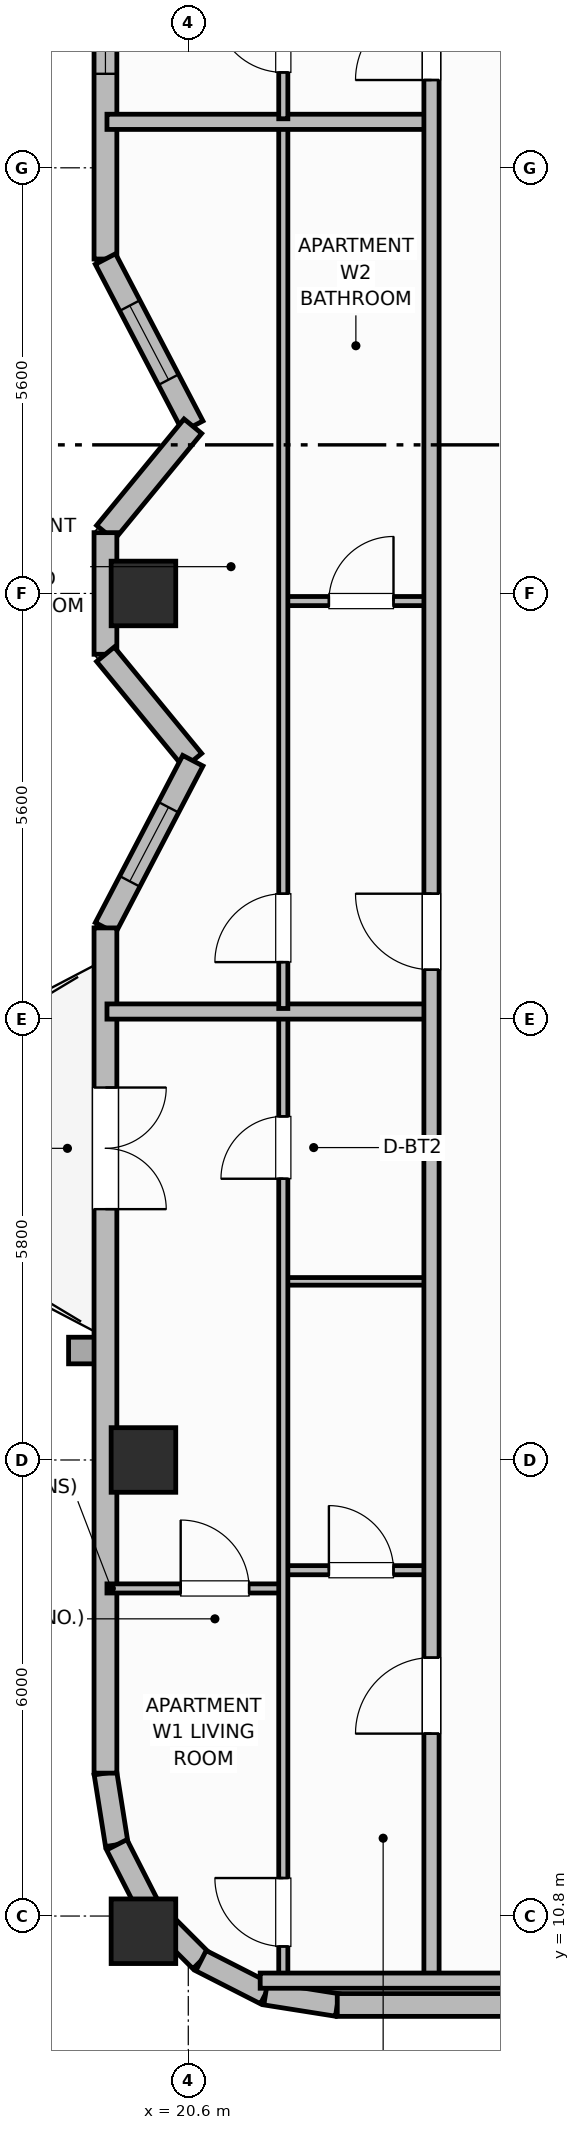
"""IFC4 building model, lengths in metres.
Left out: names, types, materials, properties, quantities, classifications, styles, units other than length and angle.
Written with IfcOpenShell. Run it as: python <this file> out.ifc"""

import sys

from ifc_helpers import new_model, si_unit, direction, frame, frame_2d, origin, origin_2d, place, context, subcontext, project, spatial, rectangle, extrude, element, fill, save


model = new_model("IFC4")
c1 = context("Model", 3, precision=1e-05, world=origin(), true_north=direction((0.0, 1.0)))
c2 = subcontext(c1, "Body", "Model", "MODEL_VIEW")
j1 = project(units=[si_unit("LENGTHUNIT", "METRE"), si_unit("PLANEANGLEUNIT", "RADIAN")], contexts=[c1])
p1 = place(None, origin())
s1 = spatial("IfcSite", under=j1, at=p1, CompositionType="ELEMENT")
p2 = place(p1, origin())
s2 = spatial("IfcBuilding", under=s1, at=p2, CompositionType="ELEMENT")
p3 = place(p2, frame((0.0, 0.0, 236.9)))
s3 = spatial("IfcBuildingStorey", under=s2, at=p3, CompositionType="ELEMENT", Elevation=236.9)
for number, where, z_axis, x_axis in (
    (1, (20.01, 10.6, 0.0), (0.0, 0.0, 1.0), (1.0, 0.0, 0.0)),
    (2, (20.01, 16.8, 0.0), (0.0, 0.0, 1.0), (1.0, 0.0, 0.0)),
    (3, (20.01, 28.2, 0.0), (0.0, 0.0, 1.0), (1.0, 0.0, 0.0)),
):
    element("IfcColumn", number, at=place(p3, frame(where, z_axis=z_axis, x_axis=x_axis)), inside=s3, PredefinedType="COLUMN", context=c2, shape_type="SweptSolid", body=[
        extrude(rectangle(XDim=0.85, YDim=0.85, at=origin_2d()), origin(), (0.0, 0.0, 1.0), 3.7),
    ])
p4 = place(p3, frame((19.51, 12.68, 0.0), z_axis=(0.0, 0.0, 1.0), x_axis=(0.156343617883, -0.987702725088, 0.0)))
e4 = element("IfcWall", 4, at=p4, inside=s3, PredefinedType="SOLIDWALL", context=c2, shape_type="SweptSolid", body=[
    extrude(rectangle(XDim=0.954, YDim=0.3, at=frame_2d((0.477, 0.0))), origin(), (0.0, 0.0, 1.0), 2.73),
])
for number, where, z_axis, x_axis in (
    (5, (19.659, 11.738, 0.0), (0.0, 0.0, 1.0), (0.454, -0.891, 0.0)),
    (6, (20.093, 10.887, 0.0), (0.0, 0.0, 1.0), (0.707, -0.707, 0.0)),
):
    element("IfcWall", number, at=place(p3, frame(where, z_axis=z_axis, x_axis=x_axis)), inside=s3, PredefinedType="SOLIDWALL", context=c2, shape_type="SweptSolid", body=[
        extrude(rectangle(XDim=0.954, YDim=0.3, at=frame_2d((0.477, 0.0))), origin(), (0.0, 0.0, 1.0), 2.73),
    ])
p5 = place(p3, frame((20.767, 10.212, 0.0), z_axis=(0.0, 0.0, 1.0), x_axis=(0.891023873617, -0.45395644796, 0.0)))
e7 = element("IfcWall", 7, at=p5, inside=s3, PredefinedType="SOLIDWALL", context=c2, shape_type="SweptSolid", body=[
    extrude(rectangle(XDim=0.954, YDim=0.3, at=frame_2d((0.477, 0.0))), origin(), (0.0, 0.0, 1.0), 2.73),
])
p6 = place(p3, frame((21.617, 9.779, 0.0), z_axis=(0.0, 0.0, 1.0), x_axis=(0.987669453596, -0.156553666304, 0.0)))
e8 = element("IfcWall", 8, at=p6, inside=s3, PredefinedType="SOLIDWALL", context=c2, shape_type="SweptSolid", body=[
    extrude(rectangle(XDim=0.954, YDim=0.3, at=frame_2d((0.477, 0.0))), origin(), (0.0, 0.0, 1.0), 2.73),
])
p7 = place(p3, frame((22.56, 9.63, 0.0), z_axis=(0.0, 0.0, 1.0), x_axis=(1.0, 0.0, 0.0)))
e9 = element("IfcWall", 9, at=p7, inside=s3, PredefinedType="SOLIDWALL", context=c2, shape_type="SweptSolid", body=[
    extrude(rectangle(XDim=4.45, YDim=0.3, at=frame_2d((2.225, 0.0))), origin(), (0.0, 0.0, 1.0), 2.73),
])
p8 = place(p3, frame((19.51, 43.72, 0.0), z_axis=(0.0, 0.0, 1.0), x_axis=(0.0, -1.0, 0.0)))
e10 = element("IfcWall", 10, at=p8, inside=s3, PredefinedType="SOLIDWALL", context=c2, shape_type="SweptSolid", body=[
    extrude(rectangle(XDim=11.12, YDim=0.3, at=frame_2d((5.56, 0.0))), origin(), (0.0, 0.0, 1.0), 2.73),
])
p9 = place(p8, frame((1.037, 0.0, 0.95)))
e11 = element("IfcOpeningElement", 11, at=p9, cuts=e10, PredefinedType="OPENING", context=c2, shape_type="SweptSolid", body=[
    extrude(rectangle(XDim=1.1, YDim=1.65, at=frame_2d((0.55, 0.825))), frame((0.0, 0.16, 0.0), z_axis=(0.0, -1.0, 0.0), x_axis=(1.0, 0.0, 0.0)), (0.0, 0.0, 1.0), 0.32),
])
p10 = place(p8, frame((5.36, 0.0, 0.95)))
e12 = element("IfcOpeningElement", 12, at=p10, cuts=e10, PredefinedType="OPENING", context=c2, shape_type="SweptSolid", body=[
    extrude(rectangle(XDim=1.1, YDim=1.65, at=frame_2d((0.55, 0.825))), frame((0.0, 0.16, 0.0), z_axis=(0.0, -1.0, 0.0), x_axis=(1.0, 0.0, 0.0)), (0.0, 0.0, 1.0), 0.32),
])
p11 = place(p8, frame((7.583, 0.0, 0.95)))
e13 = element("IfcOpeningElement", 13, at=p11, cuts=e10, PredefinedType="OPENING", context=c2, shape_type="SweptSolid", body=[
    extrude(rectangle(XDim=1.1, YDim=1.65, at=frame_2d((0.55, 0.825))), frame((0.0, 0.16, 0.0), z_axis=(0.0, -1.0, 0.0), x_axis=(1.0, 0.0, 0.0)), (0.0, 0.0, 1.0), 0.32),
])
p12 = place(p3, frame((19.51, 32.6, 0.0), z_axis=(0.0, 0.0, 1.0), x_axis=(0.463191013929, -0.88625847506, 0.0)))
e14 = element("IfcWall", 14, at=p12, inside=s3, PredefinedType="SOLIDWALL", context=c2, shape_type="SweptSolid", body=[
    extrude(rectangle(XDim=2.483, YDim=0.3, at=frame_2d((1.241, 0.0))), origin(), (0.0, 0.0, 1.0), 2.73),
])
p13 = place(p12, frame((0.691, 0.0, 0.92)))
e15 = element("IfcOpeningElement", 15, at=p13, cuts=e14, PredefinedType="OPENING", context=c2, shape_type="SweptSolid", body=[
    extrude(rectangle(XDim=1.1, YDim=1.65, at=frame_2d((0.55, 0.825))), frame((0.0, 0.16, 0.0), z_axis=(0.0, -1.0, 0.0), x_axis=(1.0, 0.0, 0.0)), (0.0, 0.0, 1.0), 0.32),
])
p14 = place(p3, frame((20.66, 30.4, 0.0), z_axis=(0.0, 0.0, 1.0), x_axis=(-0.634733675645, -0.772730975827, 0.0)))
e16 = element("IfcWall", 16, at=p14, inside=s3, PredefinedType="SOLIDWALL", context=c2, shape_type="SweptSolid", body=[
    extrude(rectangle(XDim=1.812, YDim=0.3, at=frame_2d((0.906, 0.0))), origin(), (0.0, 0.0, 1.0), 2.73),
])
p15 = place(p3, frame((19.51, 29.0, 0.0), z_axis=(0.0, 0.0, 1.0), x_axis=(0.0, -1.0, 0.0)))
e17 = element("IfcWall", 17, at=p15, inside=s3, PredefinedType="SOLIDWALL", context=c2, shape_type="SweptSolid", body=[
    extrude(rectangle(XDim=1.6, YDim=0.3, at=frame_2d((0.8, 0.0))), origin(), (0.0, 0.0, 1.0), 2.73),
])
p16 = place(p3, frame((19.51, 27.4, 0.0), z_axis=(0.0, 0.0, 1.0), x_axis=(0.634733675645, -0.772730975827, 0.0)))
e18 = element("IfcWall", 18, at=p16, inside=s3, PredefinedType="SOLIDWALL", context=c2, shape_type="SweptSolid", body=[
    extrude(rectangle(XDim=1.812, YDim=0.3, at=frame_2d((0.906, 0.0))), origin(), (0.0, 0.0, 1.0), 2.73),
])
p17 = place(p3, frame((20.66, 26.0, 0.0), z_axis=(0.0, 0.0, 1.0), x_axis=(-0.46323138706, -0.886237373418, 0.0)))
e19 = element("IfcWall", 19, at=p17, inside=s3, PredefinedType="SOLIDWALL", context=c2, shape_type="SweptSolid", body=[
    extrude(rectangle(XDim=2.482, YDim=0.3, at=frame_2d((1.241, 0.0))), origin(), (0.0, 0.0, 1.0), 2.73),
])
p18 = place(p17, frame((0.691, 0.0, 0.92)))
e20 = element("IfcOpeningElement", 20, at=p18, cuts=e19, PredefinedType="OPENING", context=c2, shape_type="SweptSolid", body=[
    extrude(rectangle(XDim=1.1, YDim=1.65, at=frame_2d((0.55, 0.825))), frame((0.0, 0.16, 0.0), z_axis=(0.0, -1.0, 0.0), x_axis=(1.0, 0.0, 0.0)), (0.0, 0.0, 1.0), 0.32),
])
p19 = place(p3, frame((19.51, 23.8, 0.0), z_axis=(0.0, 0.0, 1.0), x_axis=(0.0, -1.0, 0.0)))
e21 = element("IfcWall", 21, at=p19, inside=s3, PredefinedType="SOLIDWALL", context=c2, shape_type="SweptSolid", body=[
    extrude(rectangle(XDim=11.12, YDim=0.3, at=frame_2d((5.56, 0.0))), origin(), (0.0, 0.0, 1.0), 2.73),
])
p20 = place(p19, frame((2.1, 0.0, 0.0)))
e22 = element("IfcOpeningElement", 22, at=p20, cuts=e21, PredefinedType="OPENING", context=c2, shape_type="SweptSolid", body=[
    extrude(rectangle(XDim=1.6, YDim=2.1, at=frame_2d((0.8, 1.05))), frame((0.0, 0.16, 0.0), z_axis=(0.0, -1.0, 0.0), x_axis=(1.0, 0.0, 0.0)), (0.0, 0.0, 1.0), 0.32),
])
p21 = place(p3, frame((21.85, 15.35, 0.0), z_axis=(0.0, 0.0, 1.0), x_axis=(1.0, 0.0, 0.0)))
e23 = element("IfcWall", 23, at=p21, inside=s3, PredefinedType="PARTITIONING", context=c2, shape_type="SweptSolid", body=[
    extrude(rectangle(XDim=1.95, YDim=0.12, at=frame_2d((0.975, 0.0))), origin(), (0.0, 0.0, 1.0), 2.56),
])
p22 = place(p21, frame((0.6, 0.0, 0.0)))
e24 = element("IfcOpeningElement", 24, at=p22, cuts=e23, PredefinedType="OPENING", context=c2, shape_type="SweptSolid", body=[
    extrude(rectangle(XDim=0.85, YDim=2.1, at=frame_2d((0.425, 1.05))), frame((0.0, 0.07, 0.0), z_axis=(0.0, -1.0, 0.0), x_axis=(1.0, 0.0, 0.0)), (0.0, 0.0, 1.0), 0.14),
])
p23 = place(p3, frame((21.85, 19.15, 0.0), z_axis=(0.0, 0.0, 1.0), x_axis=(1.0, 0.0, 0.0)))
e25 = element("IfcWall", 25, at=p23, inside=s3, PredefinedType="PARTITIONING", context=c2, shape_type="SweptSolid", body=[
    extrude(rectangle(XDim=1.95, YDim=0.1, at=frame_2d((0.975, 0.0))), origin(), (0.0, 0.0, 1.0), 2.56),
])
p24 = place(p3, frame((19.53, 15.11, 0.0), z_axis=(0.0, 0.0, 1.0), x_axis=(1.0, 0.0, 0.0)))
e26 = element("IfcWall", 26, at=p24, inside=s3, PredefinedType="PARTITIONING", context=c2, shape_type="SweptSolid", body=[
    extrude(rectangle(XDim=2.32, YDim=0.12, at=frame_2d((1.16, 0.0))), origin(), (0.0, 0.0, 1.0), 2.56),
])
p25 = place(p24, frame((0.97, 0.0, 0.0)))
e27 = element("IfcOpeningElement", 27, at=p25, cuts=e26, PredefinedType="OPENING", context=c2, shape_type="SweptSolid", body=[
    extrude(rectangle(XDim=0.9, YDim=2.1, at=frame_2d((0.45, 1.05))), frame((0.0, 0.07, 0.0), z_axis=(0.0, -1.0, 0.0), x_axis=(1.0, 0.0, 0.0)), (0.0, 0.0, 1.0), 0.14),
])
p26 = place(p3, frame((21.85, 9.99, 0.0), z_axis=(0.0, 0.0, 1.0), x_axis=(0.0, 1.0, 0.0)))
e28 = element("IfcWall", 28, at=p26, inside=s3, PredefinedType="PARTITIONING", context=c2, shape_type="SweptSolid", body=[
    extrude(rectangle(XDim=12.67, YDim=0.12, at=frame_2d((6.335, 0.0))), origin(), (0.0, 0.0, 1.0), 2.56),
])
p27 = place(p26, frame((0.41, 0.0, 0.0)))
e29 = element("IfcOpeningElement", 29, at=p27, cuts=e28, PredefinedType="OPENING", context=c2, shape_type="SweptSolid", body=[
    extrude(rectangle(XDim=0.9, YDim=2.1, at=frame_2d((0.45, 1.05))), frame((0.0, 0.07, 0.0), z_axis=(0.0, -1.0, 0.0), x_axis=(1.0, 0.0, 0.0)), (0.0, 0.0, 1.0), 0.14),
])
p28 = place(p26, frame((10.51, 0.0, 0.0)))
e30 = element("IfcOpeningElement", 30, at=p28, cuts=e28, PredefinedType="OPENING", context=c2, shape_type="SweptSolid", body=[
    extrude(rectangle(XDim=0.82, YDim=2.08, at=frame_2d((0.41, 1.04))), frame((0.0, 0.07, 0.0), z_axis=(0.0, -1.0, 0.0), x_axis=(1.0, 0.0, 0.0)), (0.0, 0.0, 1.0), 0.14),
])
p29 = place(p3, frame((19.53, 22.7, 0.0), z_axis=(0.0, 0.0, 1.0), x_axis=(1.0, 0.0, 0.0)))
e31 = element("IfcWall", 31, at=p29, inside=s3, PredefinedType="PARTITIONING", context=c2, shape_type="SweptSolid", body=[
    extrude(rectangle(XDim=4.27, YDim=0.2, at=frame_2d((2.135, 0.0))), origin(), (0.0, 0.0, 1.0), 2.56),
])
p30 = place(p3, frame((21.85, 28.1, 0.0), z_axis=(0.0, 0.0, 1.0), x_axis=(1.0, 0.0, 0.0)))
e32 = element("IfcWall", 32, at=p30, inside=s3, PredefinedType="PARTITIONING", context=c2, shape_type="SweptSolid", body=[
    extrude(rectangle(XDim=1.95, YDim=0.12, at=frame_2d((0.975, 0.0))), origin(), (0.0, 0.0, 1.0), 2.56),
])
p31 = place(p30, frame((0.6, 0.0, 0.0)))
e33 = element("IfcOpeningElement", 33, at=p31, cuts=e32, PredefinedType="OPENING", context=c2, shape_type="SweptSolid", body=[
    extrude(rectangle(XDim=0.85, YDim=2.1, at=frame_2d((0.425, 1.05))), frame((0.0, 0.07, 0.0), z_axis=(0.0, -1.0, 0.0), x_axis=(1.0, 0.0, 0.0)), (0.0, 0.0, 1.0), 0.14),
])
p32 = place(p3, frame((21.85, 22.74, 0.0), z_axis=(0.0, 0.0, 1.0), x_axis=(0.0, 1.0, 0.0)))
e34 = element("IfcWall", 34, at=p32, inside=s3, PredefinedType="PARTITIONING", context=c2, shape_type="SweptSolid", body=[
    extrude(rectangle(XDim=11.625, YDim=0.12, at=frame_2d((5.812, 0.0))), origin(), (0.0, 0.0, 1.0), 2.56),
])
p33 = place(p32, frame((0.61, 0.0, 0.0)))
e35 = element("IfcOpeningElement", 35, at=p33, cuts=e34, PredefinedType="OPENING", context=c2, shape_type="SweptSolid", body=[
    extrude(rectangle(XDim=0.9, YDim=2.1, at=frame_2d((0.45, 1.05))), frame((0.0, 0.07, 0.0), z_axis=(0.0, -1.0, 0.0), x_axis=(1.0, 0.0, 0.0)), (0.0, 0.0, 1.0), 0.14),
])
p34 = place(p3, frame((19.53, 34.405, 0.0), z_axis=(0.0, 0.0, 1.0), x_axis=(1.0, 0.0, 0.0)))
e36 = element("IfcWall", 36, at=p34, inside=s3, PredefinedType="PARTITIONING", context=c2, shape_type="SweptSolid", body=[
    extrude(rectangle(XDim=4.27, YDim=0.2, at=frame_2d((2.135, 0.0))), origin(), (0.0, 0.0, 1.0), 2.56),
])
p35 = place(p3, frame((21.85, 34.445, 0.0), z_axis=(0.0, 0.0, 1.0), x_axis=(0.0, 1.0, 0.0)))
e37 = element("IfcWall", 37, at=p35, inside=s3, PredefinedType="PARTITIONING", context=c2, shape_type="SweptSolid", body=[
    extrude(rectangle(XDim=11.965, YDim=0.12, at=frame_2d((5.982, 0.0))), origin(), (0.0, 0.0, 1.0), 2.56),
])
p36 = place(p35, frame((0.61, 0.0, 0.0)))
e38 = element("IfcOpeningElement", 38, at=p36, cuts=e37, PredefinedType="OPENING", context=c2, shape_type="SweptSolid", body=[
    extrude(rectangle(XDim=0.9, YDim=2.1, at=frame_2d((0.45, 1.05))), frame((0.0, 0.07, 0.0), z_axis=(0.0, -1.0, 0.0), x_axis=(1.0, 0.0, 0.0)), (0.0, 0.0, 1.0), 0.14),
])
p37 = place(p35, frame((10.157, 0.0, 0.0)))
e39 = element("IfcOpeningElement", 39, at=p37, cuts=e37, PredefinedType="OPENING", context=c2, shape_type="SweptSolid", body=[
    extrude(rectangle(XDim=0.82, YDim=2.08, at=frame_2d((0.41, 1.04))), frame((0.0, 0.07, 0.0), z_axis=(0.0, -1.0, 0.0), x_axis=(1.0, 0.0, 0.0)), (0.0, 0.0, 1.0), 0.14),
])
p38 = place(p3, frame((23.8, 9.95, 0.0), z_axis=(0.0, 0.0, 1.0), x_axis=(0.0, 1.0, 0.0)))
e40 = element("IfcWall", 40, at=p38, inside=s3, PredefinedType="PARTITIONING", context=c2, shape_type="SweptSolid", body=[
    extrude(rectangle(XDim=36.5, YDim=0.2, at=frame_2d((18.25, 0.0))), origin(), (0.0, 0.0, 1.0), 2.56),
])
p39 = place(p38, frame((3.25, 0.0, 0.0)))
e41 = element("IfcOpeningElement", 41, at=p39, cuts=e40, PredefinedType="OPENING", context=c2, shape_type="SweptSolid", body=[
    extrude(rectangle(XDim=1.0, YDim=2.15, at=frame_2d((0.5, 1.075))), frame((0.0, 0.11, 0.0), z_axis=(0.0, -1.0, 0.0), x_axis=(1.0, 0.0, 0.0)), (0.0, 0.0, 1.0), 0.22),
])
p40 = place(p38, frame((13.3, 0.0, 0.0)))
e42 = element("IfcOpeningElement", 42, at=p40, cuts=e40, PredefinedType="OPENING", context=c2, shape_type="SweptSolid", body=[
    extrude(rectangle(XDim=1.0, YDim=2.15, at=frame_2d((0.5, 1.075))), frame((0.0, 0.11, 0.0), z_axis=(0.0, -1.0, 0.0), x_axis=(1.0, 0.0, 0.0)), (0.0, 0.0, 1.0), 0.22),
])
p41 = place(p38, frame((25.005, 0.0, 0.0)))
e43 = element("IfcOpeningElement", 43, at=p41, cuts=e40, PredefinedType="OPENING", context=c2, shape_type="SweptSolid", body=[
    extrude(rectangle(XDim=1.0, YDim=2.15, at=frame_2d((0.5, 1.075))), frame((0.0, 0.11, 0.0), z_axis=(0.0, -1.0, 0.0), x_axis=(1.0, 0.0, 0.0)), (0.0, 0.0, 1.0), 0.22),
])
p42 = place(p3, frame((21.546, 9.95, 0.0), z_axis=(0.0, 0.0, 1.0), x_axis=(1.0, 0.0, 0.0)))
e44 = element("IfcWall", 44, at=p42, inside=s3, PredefinedType="PARTITIONING", context=c2, shape_type="SweptSolid", body=[
    extrude(rectangle(XDim=3.754, YDim=0.2, at=frame_2d((1.877, 0.0))), origin(), (0.0, 0.0, 1.0), 2.56),
])
p43 = place(p11, origin())
e45 = element("IfcWindow", 45, at=p43, inside=s3, PartitioningType="SINGLE_PANEL", PredefinedType="WINDOW", context=c2, shape_type="SweptSolid", body=[
    extrude(rectangle(XDim=1.1, YDim=1.65, at=frame_2d((0.55, 0.825))), frame((0.0, 0.03, 0.0), z_axis=(0.0, -1.0, 0.0), x_axis=(1.0, 0.0, 0.0)), (0.0, 0.0, 1.0), 0.06),
])
fill(e13, e45)
p44 = place(p13, origin())
e46 = element("IfcWindow", 46, at=p44, inside=s3, PartitioningType="SINGLE_PANEL", PredefinedType="WINDOW", context=c2, shape_type="SweptSolid", body=[
    extrude(rectangle(XDim=1.1, YDim=1.65, at=frame_2d((0.55, 0.825))), frame((0.0, 0.03, 0.0), z_axis=(0.0, -1.0, 0.0), x_axis=(1.0, 0.0, 0.0)), (0.0, 0.0, 1.0), 0.06),
])
fill(e15, e46)
p45 = place(p18, origin())
e47 = element("IfcWindow", 47, at=p45, inside=s3, PartitioningType="SINGLE_PANEL", PredefinedType="WINDOW", context=c2, shape_type="SweptSolid", body=[
    extrude(rectangle(XDim=1.1, YDim=1.65, at=frame_2d((0.55, 0.825))), frame((0.0, 0.03, 0.0), z_axis=(0.0, -1.0, 0.0), x_axis=(1.0, 0.0, 0.0)), (0.0, 0.0, 1.0), 0.06),
])
fill(e20, e47)
p46 = place(p20, origin())
e48 = element("IfcDoor", 48, at=p46, inside=s3, OperationType="DOUBLE_DOOR_SINGLE_SWING", PredefinedType="DOOR", context=c2, shape_type="SweptSolid", body=[
    extrude(rectangle(XDim=1.6, YDim=2.1, at=frame_2d((0.8, 1.05))), frame((0.0, 0.025, 0.0), z_axis=(0.0, -1.0, 0.0), x_axis=(1.0, 0.0, 0.0)), (0.0, 0.0, 1.0), 0.05),
])
fill(e22, e48)
p47 = place(p22, origin())
e49 = element("IfcDoor", 49, at=p47, inside=s3, OperationType="SINGLE_SWING_LEFT", PredefinedType="DOOR", context=c2, shape_type="SweptSolid", body=[
    extrude(rectangle(XDim=0.85, YDim=2.1, at=frame_2d((0.425, 1.05))), frame((0.0, 0.025, 0.0), z_axis=(0.0, -1.0, 0.0), x_axis=(1.0, 0.0, 0.0)), (0.0, 0.0, 1.0), 0.05),
])
fill(e24, e49)
p48 = place(p25, origin())
e50 = element("IfcDoor", 50, at=p48, inside=s3, OperationType="SINGLE_SWING_LEFT", PredefinedType="DOOR", context=c2, shape_type="SweptSolid", body=[
    extrude(rectangle(XDim=0.9, YDim=2.1, at=frame_2d((0.45, 1.05))), frame((0.0, 0.025, 0.0), z_axis=(0.0, -1.0, 0.0), x_axis=(1.0, 0.0, 0.0)), (0.0, 0.0, 1.0), 0.05),
])
fill(e27, e50)
p49 = place(p27, origin())
e51 = element("IfcDoor", 51, at=p49, inside=s3, OperationType="SINGLE_SWING_RIGHT", PredefinedType="DOOR", context=c2, shape_type="SweptSolid", body=[
    extrude(rectangle(XDim=0.9, YDim=2.1, at=frame_2d((0.45, 1.05))), frame((0.0, 0.025, 0.0), z_axis=(0.0, -1.0, 0.0), x_axis=(1.0, 0.0, 0.0)), (0.0, 0.0, 1.0), 0.05),
])
fill(e29, e51)
p50 = place(p28, origin())
e52 = element("IfcDoor", 52, at=p50, inside=s3, OperationType="SINGLE_SWING_LEFT", PredefinedType="DOOR", context=c2, shape_type="SweptSolid", body=[
    extrude(rectangle(XDim=0.82, YDim=2.08, at=frame_2d((0.41, 1.04))), frame((0.0, 0.025, 0.0), z_axis=(0.0, -1.0, 0.0), x_axis=(1.0, 0.0, 0.0)), (0.0, 0.0, 1.0), 0.05),
])
fill(e30, e52)
p51 = place(p31, origin())
e53 = element("IfcDoor", 53, at=p51, inside=s3, OperationType="SINGLE_SWING_RIGHT", PredefinedType="DOOR", context=c2, shape_type="SweptSolid", body=[
    extrude(rectangle(XDim=0.85, YDim=2.1, at=frame_2d((0.425, 1.05))), frame((0.0, 0.025, 0.0), z_axis=(0.0, -1.0, 0.0), x_axis=(1.0, 0.0, 0.0)), (0.0, 0.0, 1.0), 0.05),
])
fill(e33, e53)
p52 = place(p33, origin())
e54 = element("IfcDoor", 54, at=p52, inside=s3, OperationType="SINGLE_SWING_LEFT", PredefinedType="DOOR", context=c2, shape_type="SweptSolid", body=[
    extrude(rectangle(XDim=0.9, YDim=2.1, at=frame_2d((0.45, 1.05))), frame((0.0, 0.025, 0.0), z_axis=(0.0, -1.0, 0.0), x_axis=(1.0, 0.0, 0.0)), (0.0, 0.0, 1.0), 0.05),
])
fill(e35, e54)
p53 = place(p36, origin())
e55 = element("IfcDoor", 55, at=p53, inside=s3, OperationType="SINGLE_SWING_RIGHT", PredefinedType="DOOR", context=c2, shape_type="SweptSolid", body=[
    extrude(rectangle(XDim=0.9, YDim=2.1, at=frame_2d((0.45, 1.05))), frame((0.0, 0.025, 0.0), z_axis=(0.0, -1.0, 0.0), x_axis=(1.0, 0.0, 0.0)), (0.0, 0.0, 1.0), 0.05),
])
fill(e38, e55)
p54 = place(p39, origin())
e56 = element("IfcDoor", 56, at=p54, inside=s3, OperationType="SINGLE_SWING_LEFT", PredefinedType="DOOR", context=c2, shape_type="SweptSolid", body=[
    extrude(rectangle(XDim=1.0, YDim=2.15, at=frame_2d((0.5, 1.075))), frame((0.0, 0.025, 0.0), z_axis=(0.0, -1.0, 0.0), x_axis=(1.0, 0.0, 0.0)), (0.0, 0.0, 1.0), 0.05),
])
fill(e41, e56)
p55 = place(p40, origin())
e57 = element("IfcDoor", 57, at=p55, inside=s3, OperationType="SINGLE_SWING_RIGHT", PredefinedType="DOOR", context=c2, shape_type="SweptSolid", body=[
    extrude(rectangle(XDim=1.0, YDim=2.15, at=frame_2d((0.5, 1.075))), frame((0.0, 0.025, 0.0), z_axis=(0.0, -1.0, 0.0), x_axis=(1.0, 0.0, 0.0)), (0.0, 0.0, 1.0), 0.05),
])
fill(e42, e57)
p56 = place(p41, origin())
e58 = element("IfcDoor", 58, at=p56, inside=s3, OperationType="SINGLE_SWING_LEFT", PredefinedType="DOOR", context=c2, shape_type="SweptSolid", body=[
    extrude(rectangle(XDim=1.0, YDim=2.15, at=frame_2d((0.5, 1.075))), frame((0.0, 0.025, 0.0), z_axis=(0.0, -1.0, 0.0), x_axis=(1.0, 0.0, 0.0)), (0.0, 0.0, 1.0), 0.05),
])
fill(e43, e58)
save(model, sys.argv[1])
